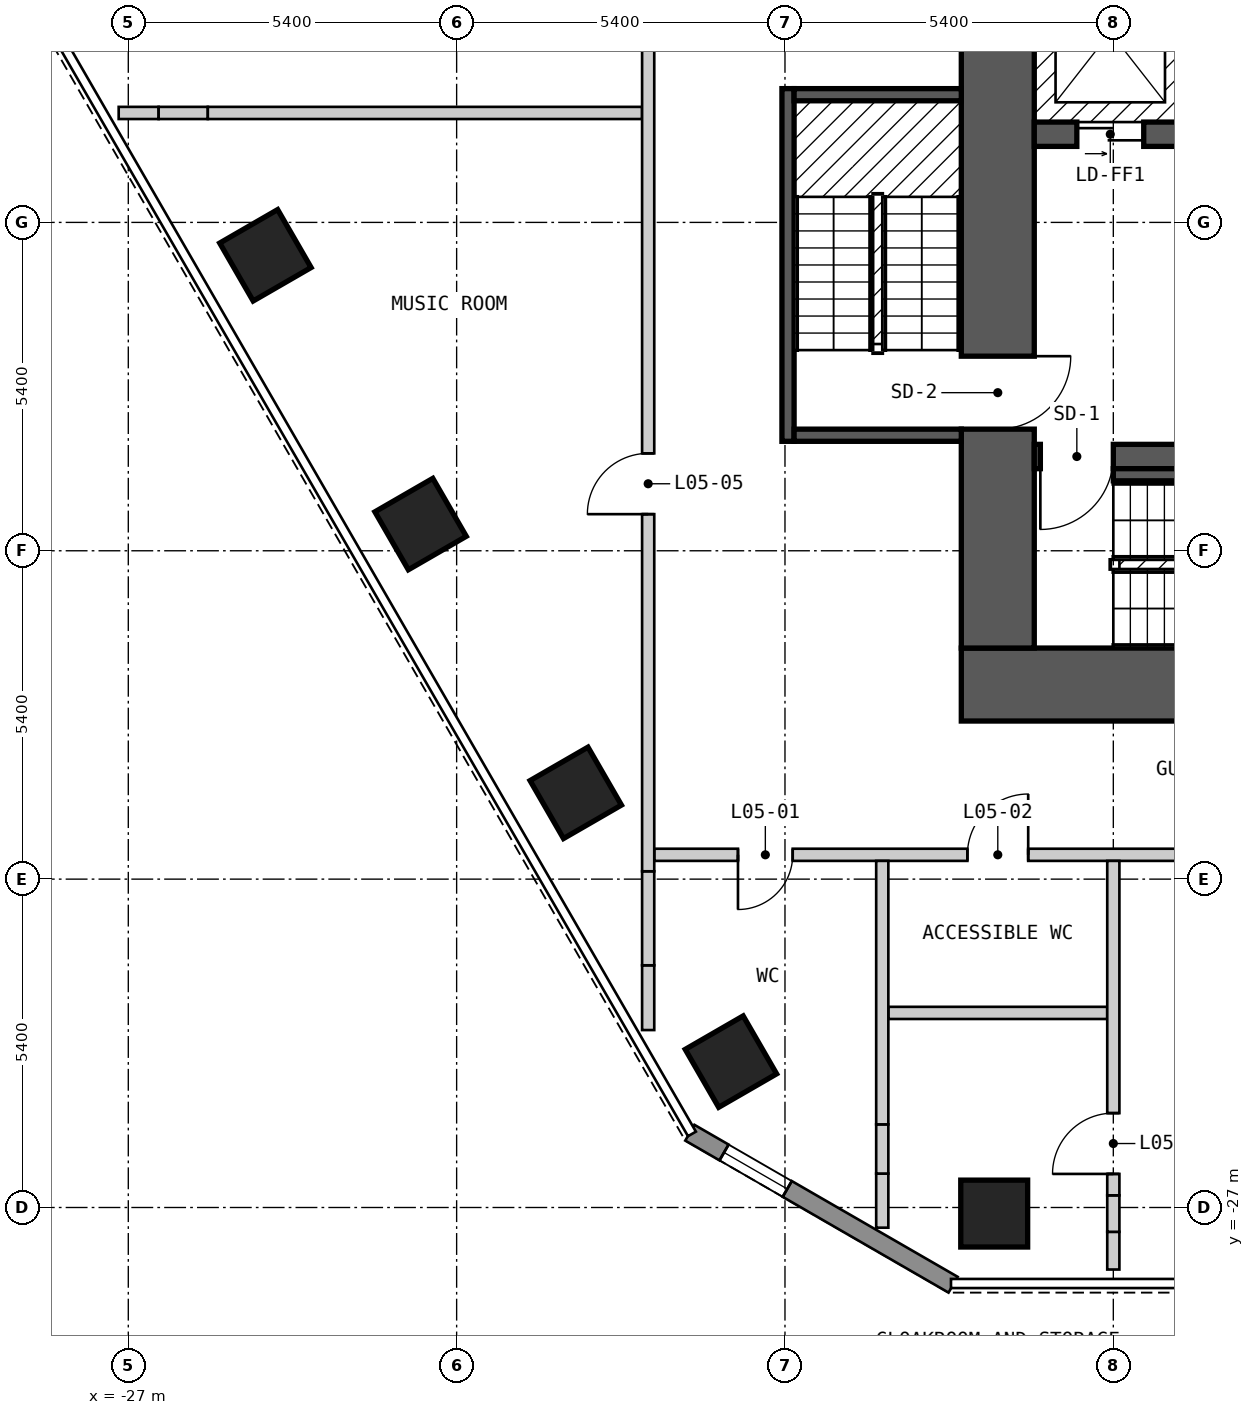
"""IFC4 building model, lengths in metres.
Left out: names, types, materials, properties, quantities, classifications, styles, units other than length and angle.
Written with IfcOpenShell. Run it as: python <this file> out.ifc"""

import sys

from ifc_helpers import new_model, si_unit, direction, frame, frame_2d, origin, origin_2d, place, context, subcontext, project, spatial, polyline, rectangle, outline, extrude, element, fill, save


model = new_model("IFC4")
c1 = context("Model", 3, precision=1e-05, world=origin(), true_north=direction((0.0, 1.0)))
c2 = subcontext(c1, "Body", "Model", "MODEL_VIEW")
j1 = project(units=[si_unit("LENGTHUNIT", "METRE"), si_unit("PLANEANGLEUNIT", "RADIAN")], contexts=[c1])
p1 = place(None, origin())
s1 = spatial("IfcSite", under=j1, at=p1, CompositionType="ELEMENT")
p2 = place(p1, origin())
s2 = spatial("IfcBuilding", under=s1, at=p2, CompositionType="ELEMENT")
p3 = place(p2, frame((0.0, 0.0, 19.8)))
s3 = spatial("IfcBuildingStorey", under=s2, at=p3, CompositionType="ELEMENT", Elevation=19.8)
for number, where, z_axis, x_axis in (
    (1, (-24.745, -11.341, 0.0), (0.0, 0.0, 1.0), (0.5, -0.866, 0.0)),
    (2, (-22.193, -15.761, 0.0), (0.0, 0.0, 1.0), (0.5, -0.866, 0.0)),
    (3, (-19.641, -20.181, 0.0), (0.0, 0.0, 1.0), (0.5, -0.866, 0.0)),
    (4, (-17.089, -24.601, 0.0), (0.0, 0.0, 1.0), (0.5, -0.866, 0.0)),
    (5, (-12.759, -27.1, 0.0), (0.0, 0.0, 1.0), (1.0, 0.0, 0.0)),
):
    element("IfcColumn", number, at=place(p3, frame(where, z_axis=z_axis, x_axis=x_axis)), inside=s3, PredefinedType="COLUMN", context=c2, shape_type="SweptSolid", body=[
        extrude(rectangle(XDim=1.1, YDim=1.1, at=origin_2d()), origin(), (0.0, 0.0, 1.0), 3.6),
    ])
p4 = place(p3, frame((-13.3, -18.4, 0.0), z_axis=(0.0, 0.0, 1.0), x_axis=(1.0, 0.0, 0.0)))
e6 = element("IfcWall", 6, at=p4, inside=s3, PredefinedType="SHEAR", context=c2, shape_type="SweptSolid", body=[
    extrude(rectangle(XDim=26.6, YDim=1.2, at=frame_2d((13.3, 0.0))), origin(), (0.0, 0.0, 1.0), 2.8),
])
p5 = place(p3, frame((-12.7, -17.8, 0.0), z_axis=(0.0, 0.0, 1.0), x_axis=(0.0, 1.0, 0.0)))
e7 = element("IfcWall", 7, at=p5, inside=s3, PredefinedType="SHEAR", context=c2, shape_type="SweptSolid", body=[
    extrude(rectangle(XDim=11.6, YDim=1.2, at=frame_2d((5.8, 0.0))), origin(), (0.0, 0.0, 1.0), 2.8),
])
p6 = place(p5, frame((3.6, 0.0, 0.0)))
e8 = element("IfcOpeningElement", 8, at=p6, cuts=e7, PredefinedType="OPENING", context=c2, shape_type="SweptSolid", body=[
    extrude(rectangle(XDim=1.2, YDim=2.1, at=frame_2d((0.6, 1.05))), frame((0.0, 0.61, 0.0), z_axis=(0.0, -1.0, 0.0), x_axis=(1.0, 0.0, 0.0)), (0.0, 0.0, 1.0), 1.22),
])
p7 = place(p3, frame((-12.1, -14.65, 0.0), z_axis=(0.0, 0.0, 1.0), x_axis=(1.0, 0.0, 0.0)))
e9 = element("IfcWall", 9, at=p7, inside=s3, PredefinedType="SHEAR", context=c2, shape_type="SweptSolid", body=[
    extrude(rectangle(XDim=24.2, YDim=0.4, at=frame_2d((12.1, 0.0))), origin(), (0.0, 0.0, 1.0), 2.8),
])
p8 = place(p7, frame((1.3, 0.0, 0.0), z_axis=(0.0, 0.0, 1.0), x_axis=(-1.0, 0.0, 0.0)))
e10 = element("IfcOpeningElement", 10, at=p8, cuts=e9, PredefinedType="OPENING", context=c2, shape_type="SweptSolid", body=[
    extrude(rectangle(XDim=1.2, YDim=2.1, at=frame_2d((0.6, 1.05))), frame((0.0, 0.21, 0.0), z_axis=(0.0, -1.0, 0.0), x_axis=(1.0, 0.0, 0.0)), (0.0, 0.0, 1.0), 0.42),
])
p9 = place(p7, frame((24.15, 0.0, 0.0), z_axis=(0.0, 0.0, 1.0), x_axis=(-1.0, 0.0, 0.0)))
e11 = element("IfcOpeningElement", 11, at=p9, cuts=e9, PredefinedType="OPENING", context=c2, shape_type="SweptSolid", body=[
    extrude(rectangle(XDim=1.2, YDim=2.1, at=frame_2d((0.6, 1.05))), frame((0.0, 0.21, 0.0), z_axis=(0.0, -1.0, 0.0), x_axis=(1.0, 0.0, 0.0)), (0.0, 0.0, 1.0), 0.42),
])
p10 = place(p7, frame((16.25, 0.0, 0.0), z_axis=(0.0, 0.0, 1.0), x_axis=(-1.0, 0.0, 0.0)))
e12 = element("IfcOpeningElement", 12, at=p10, cuts=e9, PredefinedType="OPENING", context=c2, shape_type="SweptSolid", body=[
    extrude(rectangle(XDim=0.9, YDim=2.1, at=frame_2d((0.45, 1.05))), frame((0.0, 0.21, 0.0), z_axis=(0.0, -1.0, 0.0), x_axis=(1.0, 0.0, 0.0)), (0.0, 0.0, 1.0), 0.42),
])
p11 = place(p7, frame((18.05, 0.0, 0.0), z_axis=(0.0, 0.0, 1.0), x_axis=(-1.0, 0.0, 0.0)))
e13 = element("IfcOpeningElement", 13, at=p11, cuts=e9, PredefinedType="OPENING", context=c2, shape_type="SweptSolid", body=[
    extrude(rectangle(XDim=0.9, YDim=2.1, at=frame_2d((0.45, 1.05))), frame((0.0, 0.21, 0.0), z_axis=(0.0, -1.0, 0.0), x_axis=(1.0, 0.0, 0.0)), (0.0, 0.0, 1.0), 0.42),
])
p12 = place(p3, frame((-12.1, -9.35, 0.0), z_axis=(0.0, 0.0, 1.0), x_axis=(1.0, 0.0, 0.0)))
e14 = element("IfcWall", 14, at=p12, inside=s3, PredefinedType="SHEAR", context=c2, shape_type="SweptSolid", body=[
    extrude(rectangle(XDim=22.3, YDim=0.4, at=frame_2d((11.15, 0.0))), origin(), (0.0, 0.0, 1.0), 2.8),
])
p13 = place(p12, frame((0.7, 0.0, 0.0)))
e15 = element("IfcOpeningElement", 15, at=p13, cuts=e14, PredefinedType="OPENING", context=c2, shape_type="SweptSolid", body=[
    extrude(rectangle(XDim=1.1, YDim=2.1, at=frame_2d((0.55, 1.05))), frame((0.0, 0.21, 0.0), z_axis=(0.0, -1.0, 0.0), x_axis=(1.0, 0.0, 0.0)), (0.0, 0.0, 1.0), 0.42),
])
p14 = place(p12, frame((3.5, 0.0, 0.0)))
e16 = element("IfcOpeningElement", 16, at=p14, cuts=e14, PredefinedType="OPENING", context=c2, shape_type="SweptSolid", body=[
    extrude(rectangle(XDim=1.1, YDim=2.1, at=frame_2d((0.55, 1.05))), frame((0.0, 0.21, 0.0), z_axis=(0.0, -1.0, 0.0), x_axis=(1.0, 0.0, 0.0)), (0.0, 0.0, 1.0), 0.42),
])
p15 = place(p12, frame((6.3, 0.0, 0.0)))
e17 = element("IfcOpeningElement", 17, at=p15, cuts=e14, PredefinedType="OPENING", context=c2, shape_type="SweptSolid", body=[
    extrude(rectangle(XDim=1.1, YDim=2.1, at=frame_2d((0.55, 1.05))), frame((0.0, 0.21, 0.0), z_axis=(0.0, -1.0, 0.0), x_axis=(1.0, 0.0, 0.0)), (0.0, 0.0, 1.0), 0.42),
])
p16 = place(p12, frame((8.6, 0.0, 0.0)))
e18 = element("IfcOpeningElement", 18, at=p16, cuts=e14, PredefinedType="OPENING", context=c2, shape_type="SweptSolid", body=[
    extrude(rectangle(XDim=1.1, YDim=2.1, at=frame_2d((0.55, 1.05))), frame((0.0, 0.21, 0.0), z_axis=(0.0, -1.0, 0.0), x_axis=(1.0, 0.0, 0.0)), (0.0, 0.0, 1.0), 0.42),
])
p17 = place(p12, frame((10.9, 0.0, 0.0)))
e19 = element("IfcOpeningElement", 19, at=p17, cuts=e14, PredefinedType="OPENING", context=c2, shape_type="SweptSolid", body=[
    extrude(rectangle(XDim=1.1, YDim=2.1, at=frame_2d((0.55, 1.05))), frame((0.0, 0.21, 0.0), z_axis=(0.0, -1.0, 0.0), x_axis=(1.0, 0.0, 0.0)), (0.0, 0.0, 1.0), 0.42),
])
p18 = place(p12, frame((13.2, 0.0, 0.0)))
e20 = element("IfcOpeningElement", 20, at=p18, cuts=e14, PredefinedType="OPENING", context=c2, shape_type="SweptSolid", body=[
    extrude(rectangle(XDim=1.1, YDim=2.1, at=frame_2d((0.55, 1.05))), frame((0.0, 0.21, 0.0), z_axis=(0.0, -1.0, 0.0), x_axis=(1.0, 0.0, 0.0)), (0.0, 0.0, 1.0), 0.42),
])
p19 = place(p12, frame((15.5, 0.0, 0.0)))
e21 = element("IfcOpeningElement", 21, at=p19, cuts=e14, PredefinedType="OPENING", context=c2, shape_type="SweptSolid", body=[
    extrude(rectangle(XDim=1.1, YDim=2.1, at=frame_2d((0.55, 1.05))), frame((0.0, 0.21, 0.0), z_axis=(0.0, -1.0, 0.0), x_axis=(1.0, 0.0, 0.0)), (0.0, 0.0, 1.0), 0.42),
])
p20 = place(p12, frame((17.8, 0.0, 0.0)))
e22 = element("IfcOpeningElement", 22, at=p20, cuts=e14, PredefinedType="OPENING", context=c2, shape_type="SweptSolid", body=[
    extrude(rectangle(XDim=1.1, YDim=2.1, at=frame_2d((0.55, 1.05))), frame((0.0, 0.21, 0.0), z_axis=(0.0, -1.0, 0.0), x_axis=(1.0, 0.0, 0.0)), (0.0, 0.0, 1.0), 0.42),
])
p21 = place(p12, frame((20.2, 0.0, 0.0)))
e23 = element("IfcOpeningElement", 23, at=p21, cuts=e14, PredefinedType="OPENING", context=c2, shape_type="SweptSolid", body=[
    extrude(rectangle(XDim=1.1, YDim=2.1, at=frame_2d((0.55, 1.05))), frame((0.0, 0.21, 0.0), z_axis=(0.0, -1.0, 0.0), x_axis=(1.0, 0.0, 0.0)), (0.0, 0.0, 1.0), 0.42),
])
p22 = place(p3, frame((-17.765, -25.77, 0.0), z_axis=(0.0, 0.0, 1.0), x_axis=(0.866010750942, -0.50002537861, 0.0)))
e24 = element("IfcWall", 24, at=p22, inside=s3, PredefinedType="SOLIDWALL", context=c2, shape_type="SweptSolid", body=[
    extrude(outline(polyline([(0.0, -0.15), (5.0, -0.15), (4.919, 0.15), (0.08, 0.15), (0.0, -0.15)])), origin(), (0.0, 0.0, 1.0), 2.8),
])
p23 = place(p22, frame((0.65, 0.0, 0.15)))
e25 = element("IfcOpeningElement", 25, at=p23, cuts=e24, PredefinedType="OPENING", context=c2, shape_type="SweptSolid", body=[
    extrude(rectangle(XDim=1.2, YDim=2.1, at=frame_2d((0.6, 1.05))), frame((0.0, 0.16, 0.0), z_axis=(0.0, -1.0, 0.0), x_axis=(1.0, 0.0, 0.0)), (0.0, 0.0, 1.0), 0.32),
])
p24 = place(p3, frame((-14.5, -23.8, 0.0), z_axis=(0.0, 0.0, 1.0), x_axis=(1.0, 0.0, 0.0)))
e26 = element("IfcWall", 26, at=p24, inside=s3, PredefinedType="PARTITIONING", context=c2, shape_type="SweptSolid", body=[
    extrude(rectangle(XDim=3.6, YDim=0.2, at=frame_2d((1.8, 0.0))), origin(), (0.0, 0.0, 1.0), 2.8),
])
p25 = place(p3, frame((-18.35, -21.2, 0.0), z_axis=(0.0, 0.0, 1.0), x_axis=(1.0, 0.0, 0.0)))
e27 = element("IfcWall", 27, at=p25, inside=s3, PredefinedType="PARTITIONING", context=c2, shape_type="SweptSolid", body=[
    extrude(rectangle(XDim=24.1, YDim=0.2, at=frame_2d((12.05, 0.0))), origin(), (0.0, 0.0, 1.0), 2.8),
])
p26 = place(p25, frame((2.277, 0.0, 0.0), z_axis=(0.0, 0.0, 1.0), x_axis=(-1.0, 0.0, 0.0)))
e28 = element("IfcOpeningElement", 28, at=p26, cuts=e27, PredefinedType="OPENING", context=c2, shape_type="SweptSolid", body=[
    extrude(rectangle(XDim=0.9, YDim=2.1, at=frame_2d((0.45, 1.05))), frame((0.0, 0.11, 0.0), z_axis=(0.0, -1.0, 0.0), x_axis=(1.0, 0.0, 0.0)), (0.0, 0.0, 1.0), 0.22),
])
p27 = place(p25, frame((6.15, 0.0, 0.0), z_axis=(0.0, 0.0, 1.0), x_axis=(-1.0, 0.0, 0.0)))
e29 = element("IfcOpeningElement", 29, at=p27, cuts=e27, PredefinedType="OPENING", context=c2, shape_type="SweptSolid", body=[
    extrude(rectangle(XDim=1.0, YDim=2.1, at=frame_2d((0.5, 1.05))), frame((0.0, 0.11, 0.0), z_axis=(0.0, -1.0, 0.0), x_axis=(1.0, 0.0, 0.0)), (0.0, 0.0, 1.0), 0.22),
])
p28 = place(p25, frame((14.923, 0.0, 0.0)))
e30 = element("IfcOpeningElement", 30, at=p28, cuts=e27, PredefinedType="OPENING", context=c2, shape_type="SweptSolid", body=[
    extrude(rectangle(XDim=1.8, YDim=2.1, at=frame_2d((0.9, 1.05))), frame((0.0, 0.11, 0.0), z_axis=(0.0, -1.0, 0.0), x_axis=(1.0, 0.0, 0.0)), (0.0, 0.0, 1.0), 0.22),
])
p29 = place(p3, frame((-27.158, -9.0, 0.0), z_axis=(0.0, 0.0, 1.0), x_axis=(1.0, 0.0, 0.0)))
e31 = element("IfcWall", 31, at=p29, inside=s3, PredefinedType="PARTITIONING", context=c2, shape_type="SweptSolid", body=[
    extrude(rectangle(XDim=0.657, YDim=0.2, at=frame_2d((0.329, 0.0))), origin(), (0.0, 0.0, 1.0), 2.8),
])
p30 = place(p3, frame((-26.501, -9.0, 0.0), z_axis=(0.0, 0.0, 1.0), x_axis=(1.0, 0.0, 0.0)))
e32 = element("IfcWall", 32, at=p30, inside=s3, PredefinedType="PARTITIONING", context=c2, shape_type="SweptSolid", body=[
    extrude(rectangle(XDim=0.809, YDim=0.2, at=frame_2d((0.405, 0.0))), origin(), (0.0, 0.0, 1.0), 2.07),
])
p31 = place(p3, frame((-25.692, -9.0, 0.0), z_axis=(0.0, 0.0, 1.0), x_axis=(1.0, 0.0, 0.0)))
e33 = element("IfcWall", 33, at=p31, inside=s3, PredefinedType="PARTITIONING", context=c2, shape_type="SweptSolid", body=[
    extrude(rectangle(XDim=7.142, YDim=0.2, at=frame_2d((3.571, 0.0))), origin(), (0.0, 0.0, 1.0), 2.8),
])
p32 = place(p3, frame((-18.45, -24.082, 0.0), z_axis=(0.0, 0.0, 1.0), x_axis=(0.0, 1.0, 0.0)))
e34 = element("IfcWall", 34, at=p32, inside=s3, PredefinedType="PARTITIONING", context=c2, shape_type="SweptSolid", body=[
    extrude(rectangle(XDim=1.065, YDim=0.2, at=frame_2d((0.532, 0.0))), origin(), (0.0, 0.0, 1.0), 2.8),
])
p33 = place(p3, frame((-18.45, -23.017, 0.0), z_axis=(0.0, 0.0, 1.0), x_axis=(0.0, 1.0, 0.0)))
e35 = element("IfcWall", 35, at=p33, inside=s3, PredefinedType="PARTITIONING", context=c2, shape_type="SweptSolid", body=[
    extrude(rectangle(XDim=1.546, YDim=0.2, at=frame_2d((0.773, 0.0))), origin(), (0.0, 0.0, 1.0), 2.07),
])
p34 = place(p3, frame((-18.45, -21.471, 0.0), z_axis=(0.0, 0.0, 1.0), x_axis=(0.0, 1.0, 0.0)))
e36 = element("IfcWall", 36, at=p34, inside=s3, PredefinedType="PARTITIONING", context=c2, shape_type="SweptSolid", body=[
    extrude(rectangle(XDim=23.371, YDim=0.2, at=frame_2d((11.686, 0.0))), origin(), (0.0, 0.0, 1.0), 2.8),
])
p35 = place(p34, frame((5.873, 0.0, 0.0)))
e37 = element("IfcOpeningElement", 37, at=p35, cuts=e36, PredefinedType="OPENING", context=c2, shape_type="SweptSolid", body=[
    extrude(rectangle(XDim=1.0, YDim=2.1, at=frame_2d((0.5, 1.05))), frame((0.0, 0.11, 0.0), z_axis=(0.0, -1.0, 0.0), x_axis=(1.0, 0.0, 0.0)), (0.0, 0.0, 1.0), 0.22),
])
p36 = place(p34, frame((17.469, 0.0, 0.0)))
e38 = element("IfcOpeningElement", 38, at=p36, cuts=e36, PredefinedType="OPENING", context=c2, shape_type="SweptSolid", body=[
    extrude(rectangle(XDim=1.0, YDim=2.1, at=frame_2d((0.5, 1.05))), frame((0.0, 0.11, 0.0), z_axis=(0.0, -1.0, 0.0), x_axis=(1.0, 0.0, 0.0)), (0.0, 0.0, 1.0), 0.22),
])
p37 = place(p3, frame((-14.6, -27.332, 0.0), z_axis=(0.0, 0.0, 1.0), x_axis=(0.0, 1.0, 0.0)))
e39 = element("IfcWall", 39, at=p37, inside=s3, PredefinedType="PARTITIONING", context=c2, shape_type="SweptSolid", body=[
    extrude(rectangle(XDim=0.89, YDim=0.2, at=frame_2d((0.445, 0.0))), origin(), (0.0, 0.0, 1.0), 2.8),
])
p38 = place(p3, frame((-14.6, -26.442, 0.0), z_axis=(0.0, 0.0, 1.0), x_axis=(0.0, 1.0, 0.0)))
e40 = element("IfcWall", 40, at=p38, inside=s3, PredefinedType="PARTITIONING", context=c2, shape_type="SweptSolid", body=[
    extrude(rectangle(XDim=0.809, YDim=0.2, at=frame_2d((0.404, 0.0))), origin(), (0.0, 0.0, 1.0), 2.07),
])
p39 = place(p3, frame((-14.6, -25.633, 0.0), z_axis=(0.0, 0.0, 1.0), x_axis=(0.0, 1.0, 0.0)))
e41 = element("IfcWall", 41, at=p39, inside=s3, PredefinedType="PARTITIONING", context=c2, shape_type="SweptSolid", body=[
    extrude(rectangle(XDim=4.333, YDim=0.2, at=frame_2d((2.167, 0.0))), origin(), (0.0, 0.0, 1.0), 2.8),
])
p40 = place(p3, frame((-10.8, -28.02, 0.0), z_axis=(0.0, 0.0, 1.0), x_axis=(0.0, 1.0, 0.0)))
e42 = element("IfcWall", 42, at=p40, inside=s3, PredefinedType="PARTITIONING", context=c2, shape_type="SweptSolid", body=[
    extrude(rectangle(XDim=0.62, YDim=0.2, at=frame_2d((0.31, 0.0))), origin(), (0.0, 0.0, 1.0), 2.8),
])
p41 = place(p3, frame((-10.8, -27.4, 0.0), z_axis=(0.0, 0.0, 1.0), x_axis=(0.0, 1.0, 0.0)))
e43 = element("IfcWall", 43, at=p41, inside=s3, PredefinedType="PARTITIONING", context=c2, shape_type="SweptSolid", body=[
    extrude(rectangle(XDim=0.6, YDim=0.2, at=frame_2d((0.3, 0.0))), origin(), (0.0, 0.0, 1.0), 2.07),
])
p42 = place(p3, frame((-10.8, -26.8, 0.0), z_axis=(0.0, 0.0, 1.0), x_axis=(0.0, 1.0, 0.0)))
e44 = element("IfcWall", 44, at=p42, inside=s3, PredefinedType="PARTITIONING", context=c2, shape_type="SweptSolid", body=[
    extrude(rectangle(XDim=5.5, YDim=0.2, at=frame_2d((2.75, 0.0))), origin(), (0.0, 0.0, 1.0), 2.8),
])
p43 = place(p42, frame((0.352, 0.0, 0.0)))
e45 = element("IfcOpeningElement", 45, at=p43, cuts=e44, PredefinedType="OPENING", context=c2, shape_type="SweptSolid", body=[
    extrude(rectangle(XDim=1.0, YDim=2.1, at=frame_2d((0.5, 1.05))), frame((0.0, 0.11, 0.0), z_axis=(0.0, -1.0, 0.0), x_axis=(1.0, 0.0, 0.0)), (0.0, 0.0, 1.0), 0.22),
])
p44 = place(p3, frame((-16.15, -14.4, 0.0), z_axis=(0.0, 0.0, 1.0), x_axis=(0.0, 1.0, 0.0)))
e46 = element("IfcWall", 46, at=p44, inside=s3, PredefinedType="SOLIDWALL", context=c2, shape_type="SweptSolid", body=[
    extrude(rectangle(XDim=5.8, YDim=0.2, at=frame_2d((2.9, 0.0))), origin(), (0.0, 0.0, 1.0), 2.8),
])
for number, where, z_axis, x_axis in (
    (47, (-16.05, -14.3, 0.0), (0.0, 0.0, 1.0), (1.0, 0.0, 0.0)),
    (48, (-16.05, -8.7, 0.0), (0.0, 0.0, 1.0), (1.0, 0.0, 0.0)),
):
    element("IfcWall", number, at=place(p3, frame(where, z_axis=z_axis, x_axis=x_axis)), inside=s3, PredefinedType="SOLIDWALL", context=c2, shape_type="SweptSolid", body=[
        extrude(rectangle(XDim=2.75, YDim=0.2, at=frame_2d((1.375, 0.0))), origin(), (0.0, 0.0, 1.0), 2.8),
    ])
p45 = place(p3, frame((-10.8, -14.95, 0.0), z_axis=(0.0, 0.0, 1.0), x_axis=(1.0, 0.0, 0.0)))
e49 = element("IfcWall", 49, at=p45, inside=s3, PredefinedType="SOLIDWALL", context=c2, shape_type="SweptSolid", body=[
    extrude(rectangle(XDim=4.1, YDim=0.2, at=frame_2d((2.05, 0.0))), origin(), (0.0, 0.0, 1.0), 2.8),
])
p46 = place(p23, origin())
e50 = element("IfcWindow", 50, at=p46, inside=s3, PartitioningType="SINGLE_PANEL", PredefinedType="WINDOW", context=c2, shape_type="SweptSolid", body=[
    extrude(rectangle(XDim=1.2, YDim=2.1, at=frame_2d((0.6, 1.05))), frame((0.0, 0.03, 0.0), z_axis=(0.0, -1.0, 0.0), x_axis=(1.0, 0.0, 0.0)), (0.0, 0.0, 1.0), 0.06),
])
fill(e25, e50)
p47 = place(p26, origin())
e51 = element("IfcDoor", 51, at=p47, inside=s3, OperationType="SINGLE_SWING_RIGHT", PredefinedType="DOOR", context=c2, shape_type="SweptSolid", body=[
    extrude(rectangle(XDim=0.9, YDim=2.1, at=frame_2d((0.45, 1.05))), frame((0.0, 0.025, 0.0), z_axis=(0.0, -1.0, 0.0), x_axis=(1.0, 0.0, 0.0)), (0.0, 0.0, 1.0), 0.05),
])
fill(e28, e51)
p48 = place(p27, origin())
e52 = element("IfcDoor", 52, at=p48, inside=s3, OperationType="SINGLE_SWING_LEFT", PredefinedType="DOOR", context=c2, shape_type="SweptSolid", body=[
    extrude(rectangle(XDim=1.0, YDim=2.1, at=frame_2d((0.5, 1.05))), frame((0.0, 0.025, 0.0), z_axis=(0.0, -1.0, 0.0), x_axis=(1.0, 0.0, 0.0)), (0.0, 0.0, 1.0), 0.05),
])
fill(e29, e52)
p49 = place(p43, origin())
e53 = element("IfcDoor", 53, at=p49, inside=s3, OperationType="SINGLE_SWING_LEFT", PredefinedType="DOOR", context=c2, shape_type="SweptSolid", body=[
    extrude(rectangle(XDim=1.0, YDim=2.1, at=frame_2d((0.5, 1.05))), frame((0.0, 0.025, 0.0), z_axis=(0.0, -1.0, 0.0), x_axis=(1.0, 0.0, 0.0)), (0.0, 0.0, 1.0), 0.05),
])
fill(e45, e53)
p50 = place(p35, origin())
e54 = element("IfcDoor", 54, at=p50, inside=s3, OperationType="SINGLE_SWING_LEFT", PredefinedType="DOOR", context=c2, shape_type="SweptSolid", body=[
    extrude(rectangle(XDim=1.0, YDim=2.1, at=frame_2d((0.5, 1.05))), frame((0.0, 0.025, 0.0), z_axis=(0.0, -1.0, 0.0), x_axis=(1.0, 0.0, 0.0)), (0.0, 0.0, 1.0), 0.05),
])
fill(e37, e54)
p51 = place(p13, origin())
e55 = element("IfcDoor", 55, at=p51, inside=s3, OperationType="DOUBLE_DOOR_SLIDING", PredefinedType="DOOR", context=c2, shape_type="SweptSolid", body=[
    extrude(rectangle(XDim=1.1, YDim=2.1, at=frame_2d((0.55, 1.05))), frame((0.0, 0.025, 0.0), z_axis=(0.0, -1.0, 0.0), x_axis=(1.0, 0.0, 0.0)), (0.0, 0.0, 1.0), 0.05),
])
fill(e15, e55)
p52 = place(p8, origin())
e56 = element("IfcDoor", 56, at=p52, inside=s3, OperationType="SINGLE_SWING_RIGHT", PredefinedType="DOOR", context=c2, shape_type="SweptSolid", body=[
    extrude(rectangle(XDim=1.2, YDim=2.1, at=frame_2d((0.6, 1.05))), frame((0.0, 0.025, 0.0), z_axis=(0.0, -1.0, 0.0), x_axis=(1.0, 0.0, 0.0)), (0.0, 0.0, 1.0), 0.05),
])
fill(e10, e56)
p53 = place(p6, origin())
e57 = element("IfcDoor", 57, at=p53, inside=s3, OperationType="SINGLE_SWING_RIGHT", PredefinedType="DOOR", context=c2, shape_type="SweptSolid", body=[
    extrude(rectangle(XDim=1.2, YDim=2.1, at=frame_2d((0.6, 1.05))), frame((0.0, 0.025, 0.0), z_axis=(0.0, -1.0, 0.0), x_axis=(1.0, 0.0, 0.0)), (0.0, 0.0, 1.0), 0.05),
])
fill(e8, e57)
save(model, sys.argv[1])
